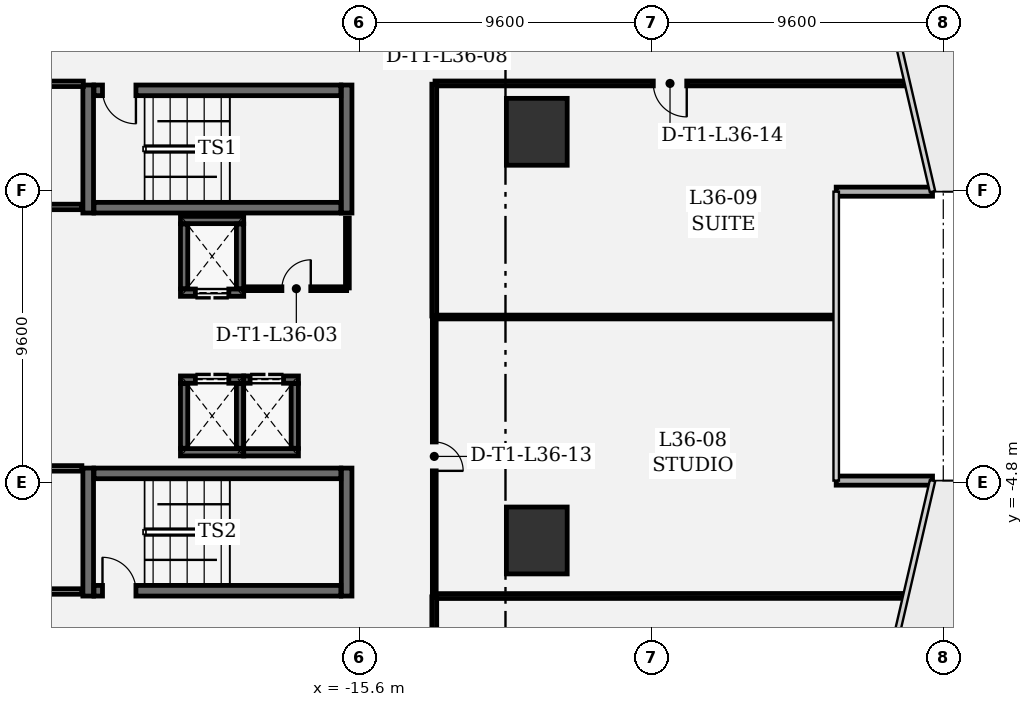
"""IFC4 building model, lengths in metres.
Left out: names, types, materials, properties, quantities, classifications, styles, units other than length and angle.
Written with IfcOpenShell. Run it as: python <this file> out.ifc"""

import sys

from ifc_helpers import new_model, si_unit, direction, frame, frame_2d, origin, origin_2d, place, context, subcontext, project, spatial, rectangle, extrude, element, fill, save


model = new_model("IFC4")
c1 = context("Model", 3, precision=1e-05, world=origin(), true_north=direction((0.0, 1.0)))
c2 = subcontext(c1, "Body", "Model", "MODEL_VIEW")
j1 = project(units=[si_unit("LENGTHUNIT", "METRE"), si_unit("PLANEANGLEUNIT", "RADIAN")], contexts=[c1])
p1 = place(None, origin())
s1 = spatial("IfcSite", under=j1, at=p1, CompositionType="ELEMENT")
p2 = place(p1, origin())
s2 = spatial("IfcBuilding", under=s1, at=p2, CompositionType="ELEMENT")
p3 = place(p2, frame((0.0, 0.0, 158.4)))
s3 = spatial("IfcBuildingStorey", under=s2, at=p3, CompositionType="ELEMENT", Elevation=158.4)
for number, where, z_axis, x_axis in (
    (1, (-9.77, -6.721, 0.0), (0.0, 0.0, 1.0), (1.0, 0.0, 0.0)),
    (2, (-9.77, 6.721, 0.0), (0.0, 0.0, 1.0), (1.0, 0.0, 0.0)),
):
    element("IfcColumn", number, at=place(p3, frame(where, z_axis=z_axis, x_axis=x_axis)), inside=s3, PredefinedType="COLUMN", context=c2, shape_type="SweptSolid", body=[
        extrude(rectangle(XDim=2.0, YDim=2.2, at=origin_2d()), origin(), (0.0, 0.0, 1.0), 4.05),
    ])
for number, where, z_axis, x_axis in (
    (3, (3.246, -4.752, 0.0), (0.0, 0.0, 1.0), (-1.0, 0.0, 0.0)),
    (4, (0.078, 4.752, 0.0), (0.0, 0.0, 1.0), (1.0, 0.0, 0.0)),
):
    element("IfcWall", number, at=place(p3, frame(where, z_axis=z_axis, x_axis=x_axis)), inside=s3, PredefinedType="SOLIDWALL", context=c2, shape_type="SweptSolid", body=[
        extrude(rectangle(XDim=3.168, YDim=0.3, at=frame_2d((1.584, 0.0))), origin(), (0.0, 0.0, 1.0), 3.78),
    ])
for number, where, z_axis, x_axis in (
    (5, (-24.525, 8.26, 0.0), (0.0, 0.0, 1.0), (0.0, -1.0, 0.0)),
    (6, (-16.025, 4.05, 0.0), (0.0, 0.0, 1.0), (0.0, 1.0, 0.0)),
):
    element("IfcWall", number, at=place(p3, frame(where, z_axis=z_axis, x_axis=x_axis)), inside=s3, PredefinedType="SHEAR", context=c2, shape_type="SweptSolid", body=[
        extrude(rectangle(XDim=4.21, YDim=0.35, at=frame_2d((2.105, 0.0))), origin(), (0.0, 0.0, 1.0), 3.78),
    ])
p4 = place(p3, frame((-24.335, 4.225, 0.0), z_axis=(0.0, 0.0, 1.0), x_axis=(1.0, 0.0, 0.0)))
e7 = element("IfcWall", 7, at=p4, inside=s3, PredefinedType="SHEAR", context=c2, shape_type="SweptSolid", body=[
    extrude(rectangle(XDim=8.12, YDim=0.35, at=frame_2d((4.06, 0.0))), origin(), (0.0, 0.0, 1.0), 3.78),
])
p5 = place(p3, frame((-16.215, 8.085, 0.0), z_axis=(0.0, 0.0, 1.0), x_axis=(-1.0, 0.0, 0.0)))
e8 = element("IfcWall", 8, at=p5, inside=s3, PredefinedType="SHEAR", context=c2, shape_type="SweptSolid", body=[
    extrude(rectangle(XDim=8.12, YDim=0.35, at=frame_2d((4.06, 0.0))), origin(), (0.0, 0.0, 1.0), 3.78),
])
p6 = place(p5, frame((6.74, 0.0, 0.0)))
e9 = element("IfcOpeningElement", 9, at=p6, cuts=e8, PredefinedType="OPENING", context=c2, shape_type="SweptSolid", body=[
    extrude(rectangle(XDim=1.1, YDim=2.2, at=frame_2d((0.55, 1.1))), frame((0.0, 0.185, 0.0), z_axis=(0.0, -1.0, 0.0), x_axis=(1.0, 0.0, 0.0)), (0.0, 0.0, 1.0), 0.37),
])
for number, where, z_axis, x_axis in (
    (10, (-24.525, -4.34, 0.0), (0.0, 0.0, 1.0), (0.0, -1.0, 0.0)),
    (11, (-16.025, -8.55, 0.0), (0.0, 0.0, 1.0), (0.0, 1.0, 0.0)),
):
    element("IfcWall", number, at=place(p3, frame(where, z_axis=z_axis, x_axis=x_axis)), inside=s3, PredefinedType="SHEAR", context=c2, shape_type="SweptSolid", body=[
        extrude(rectangle(XDim=4.21, YDim=0.35, at=frame_2d((2.105, 0.0))), origin(), (0.0, 0.0, 1.0), 3.78),
    ])
p7 = place(p3, frame((-24.335, -8.375, 0.0), z_axis=(0.0, 0.0, 1.0), x_axis=(1.0, 0.0, 0.0)))
e12 = element("IfcWall", 12, at=p7, inside=s3, PredefinedType="SHEAR", context=c2, shape_type="SweptSolid", body=[
    extrude(rectangle(XDim=8.12, YDim=0.35, at=frame_2d((4.06, 0.0))), origin(), (0.0, 0.0, 1.0), 3.78),
])
p8 = place(p7, frame((0.28, 0.0, 0.0)))
e13 = element("IfcOpeningElement", 13, at=p8, cuts=e12, PredefinedType="OPENING", context=c2, shape_type="SweptSolid", body=[
    extrude(rectangle(XDim=1.1, YDim=2.2, at=frame_2d((0.55, 1.1))), frame((0.0, 0.185, 0.0), z_axis=(0.0, -1.0, 0.0), x_axis=(1.0, 0.0, 0.0)), (0.0, 0.0, 1.0), 0.37),
])
p9 = place(p3, frame((-16.215, -4.515, 0.0), z_axis=(0.0, 0.0, 1.0), x_axis=(-1.0, 0.0, 0.0)))
e14 = element("IfcWall", 14, at=p9, inside=s3, PredefinedType="SHEAR", context=c2, shape_type="SweptSolid", body=[
    extrude(rectangle(XDim=8.12, YDim=0.35, at=frame_2d((4.06, 0.0))), origin(), (0.0, 0.0, 1.0), 3.78),
])
p10 = place(p3, frame((-19.41, 1.43, 0.0), z_axis=(0.0, 0.0, 1.0), x_axis=(-1.0, 0.0, 0.0)))
e15 = element("IfcWall", 15, at=p10, inside=s3, PredefinedType="SHEAR", context=c2, shape_type="SweptSolid", body=[
    extrude(rectangle(XDim=2.08, YDim=0.24, at=frame_2d((1.04, 0.0))), origin(), (0.0, 0.0, 1.0), 3.78),
])
p11 = place(p10, frame((0.49, 0.0, 0.0)))
e16 = element("IfcOpeningElement", 16, at=p11, cuts=e15, PredefinedType="OPENING", context=c2, shape_type="SweptSolid", body=[
    extrude(rectangle(XDim=1.1, YDim=2.2, at=frame_2d((0.55, 1.1))), frame((0.0, 0.13, 0.0), z_axis=(0.0, -1.0, 0.0), x_axis=(1.0, 0.0, 0.0)), (0.0, 0.0, 1.0), 0.26),
])
p12 = place(p3, frame((-21.49, 3.82, 0.0), z_axis=(0.0, 0.0, 1.0), x_axis=(1.0, 0.0, 0.0)))
e17 = element("IfcWall", 17, at=p12, inside=s3, PredefinedType="SHEAR", context=c2, shape_type="SweptSolid", body=[
    extrude(rectangle(XDim=2.08, YDim=0.24, at=frame_2d((1.04, 0.0))), origin(), (0.0, 0.0, 1.0), 3.78),
])
for number, where, z_axis, x_axis in (
    (18, (-21.37, 1.562, 0.0), (0.0, 0.0, 1.0), (0.0, 1.0, 0.0)),
    (19, (-19.53, 3.688, 0.0), (0.0, 0.0, 1.0), (0.0, -1.0, 0.0)),
):
    element("IfcWall", number, at=place(p3, frame(where, z_axis=z_axis, x_axis=x_axis)), inside=s3, PredefinedType="SHEAR", context=c2, shape_type="SweptSolid", body=[
        extrude(rectangle(XDim=2.126, YDim=0.24, at=frame_2d((1.063, 0.0))), origin(), (0.0, 0.0, 1.0), 3.78),
    ])
p13 = place(p3, frame((-19.41, -3.82, 0.0), z_axis=(0.0, 0.0, 1.0), x_axis=(-1.0, 0.0, 0.0)))
e20 = element("IfcWall", 20, at=p13, inside=s3, PredefinedType="SHEAR", context=c2, shape_type="SweptSolid", body=[
    extrude(rectangle(XDim=2.08, YDim=0.24, at=frame_2d((1.04, 0.0))), origin(), (0.0, 0.0, 1.0), 3.78),
])
p14 = place(p3, frame((-21.49, -1.43, 0.0), z_axis=(0.0, 0.0, 1.0), x_axis=(1.0, 0.0, 0.0)))
e21 = element("IfcWall", 21, at=p14, inside=s3, PredefinedType="SHEAR", context=c2, shape_type="SweptSolid", body=[
    extrude(rectangle(XDim=2.08, YDim=0.24, at=frame_2d((1.04, 0.0))), origin(), (0.0, 0.0, 1.0), 3.78),
])
p15 = place(p14, frame((0.49, 0.0, 0.0)))
e22 = element("IfcOpeningElement", 22, at=p15, cuts=e21, PredefinedType="OPENING", context=c2, shape_type="SweptSolid", body=[
    extrude(rectangle(XDim=1.1, YDim=2.2, at=frame_2d((0.55, 1.1))), frame((0.0, 0.13, 0.0), z_axis=(0.0, -1.0, 0.0), x_axis=(1.0, 0.0, 0.0)), (0.0, 0.0, 1.0), 0.26),
])
for number, where, z_axis, x_axis in (
    (23, (-21.37, -3.688, 0.0), (0.0, 0.0, 1.0), (0.0, 1.0, 0.0)),
    (24, (-19.53, -1.562, 0.0), (0.0, 0.0, 1.0), (0.0, -1.0, 0.0)),
):
    element("IfcWall", number, at=place(p3, frame(where, z_axis=z_axis, x_axis=x_axis)), inside=s3, PredefinedType="SHEAR", context=c2, shape_type="SweptSolid", body=[
        extrude(rectangle(XDim=2.126, YDim=0.24, at=frame_2d((1.063, 0.0))), origin(), (0.0, 0.0, 1.0), 3.78),
    ])
p16 = place(p3, frame((-17.61, -3.82, 0.0), z_axis=(0.0, 0.0, 1.0), x_axis=(-1.0, 0.0, 0.0)))
e25 = element("IfcWall", 25, at=p16, inside=s3, PredefinedType="SHEAR", context=c2, shape_type="SweptSolid", body=[
    extrude(rectangle(XDim=1.8, YDim=0.24, at=frame_2d((0.9, 0.0))), origin(), (0.0, 0.0, 1.0), 3.78),
])
p17 = place(p3, frame((-19.41, -1.43, 0.0), z_axis=(0.0, 0.0, 1.0), x_axis=(1.0, 0.0, 0.0)))
e26 = element("IfcWall", 26, at=p17, inside=s3, PredefinedType="SHEAR", context=c2, shape_type="SweptSolid", body=[
    extrude(rectangle(XDim=1.8, YDim=0.24, at=frame_2d((0.9, 0.0))), origin(), (0.0, 0.0, 1.0), 3.78),
])
p18 = place(p17, frame((0.21, 0.0, 0.0)))
e27 = element("IfcOpeningElement", 27, at=p18, cuts=e26, PredefinedType="OPENING", context=c2, shape_type="SweptSolid", body=[
    extrude(rectangle(XDim=1.1, YDim=2.2, at=frame_2d((0.55, 1.1))), frame((0.0, 0.13, 0.0), z_axis=(0.0, -1.0, 0.0), x_axis=(1.0, 0.0, 0.0)), (0.0, 0.0, 1.0), 0.26),
])
p19 = place(p3, frame((-17.73, -1.562, 0.0), z_axis=(0.0, 0.0, 1.0), x_axis=(0.0, -1.0, 0.0)))
e28 = element("IfcWall", 28, at=p19, inside=s3, PredefinedType="SHEAR", context=c2, shape_type="SweptSolid", body=[
    extrude(rectangle(XDim=2.126, YDim=0.24, at=frame_2d((1.063, 0.0))), origin(), (0.0, 0.0, 1.0), 3.78),
])
p20 = place(p3, frame((-28.355, 4.25, 0.0), z_axis=(0.0, 0.0, 1.0), x_axis=(1.0, 0.0, 0.0)))
e29 = element("IfcWall", 29, at=p20, inside=s3, PredefinedType="PARTITIONING", context=c2, shape_type="SweptSolid", body=[
    extrude(rectangle(XDim=3.622, YDim=0.18, at=frame_2d((1.811, 0.0))), origin(), (0.0, 0.0, 1.0), 3.78),
])
p21 = place(p3, frame((-24.684, 8.3, 0.0), z_axis=(0.0, 0.0, 1.0), x_axis=(-1.0, 0.0, 0.0)))
e30 = element("IfcWall", 30, at=p21, inside=s3, PredefinedType="PARTITIONING", context=c2, shape_type="SweptSolid", body=[
    extrude(rectangle(XDim=3.671, YDim=0.18, at=frame_2d((1.835, 0.0))), origin(), (0.0, 0.0, 1.0), 3.78),
])
p22 = place(p21, frame((1.335, 0.0, 0.0)))
e31 = element("IfcOpeningElement", 31, at=p22, cuts=e30, PredefinedType="OPENING", context=c2, shape_type="SweptSolid", body=[
    extrude(rectangle(XDim=1.0, YDim=2.15, at=frame_2d((0.5, 1.075))), frame((0.0, 0.1, 0.0), z_axis=(0.0, -1.0, 0.0), x_axis=(1.0, 0.0, 0.0)), (0.0, 0.0, 1.0), 0.2),
])
p23 = place(p3, frame((-28.355, -8.4, 0.0), z_axis=(0.0, 0.0, 1.0), x_axis=(1.0, 0.0, 0.0)))
e32 = element("IfcWall", 32, at=p23, inside=s3, PredefinedType="PARTITIONING", context=c2, shape_type="SweptSolid", body=[
    extrude(rectangle(XDim=3.622, YDim=0.18, at=frame_2d((1.811, 0.0))), origin(), (0.0, 0.0, 1.0), 3.78),
])
p24 = place(p23, frame((1.311, 0.0, 0.0)))
e33 = element("IfcOpeningElement", 33, at=p24, cuts=e32, PredefinedType="OPENING", context=c2, shape_type="SweptSolid", body=[
    extrude(rectangle(XDim=1.0, YDim=2.15, at=frame_2d((0.5, 1.075))), frame((0.0, 0.1, 0.0), z_axis=(0.0, -1.0, 0.0), x_axis=(1.0, 0.0, 0.0)), (0.0, 0.0, 1.0), 0.2),
])
p25 = place(p3, frame((-24.733, -4.35, 0.0), z_axis=(0.0, 0.0, 1.0), x_axis=(-1.0, 0.0, 0.0)))
e34 = element("IfcWall", 34, at=p25, inside=s3, PredefinedType="PARTITIONING", context=c2, shape_type="SweptSolid", body=[
    extrude(rectangle(XDim=3.622, YDim=0.18, at=frame_2d((1.811, 0.0))), origin(), (0.0, 0.0, 1.0), 3.78),
])
p26 = place(p3, frame((-19.334, 1.56, 0.0), z_axis=(0.0, 0.0, 1.0), x_axis=(1.0, 0.0, 0.0)))
e35 = element("IfcWall", 35, at=p26, inside=s3, PredefinedType="PARTITIONING", context=c2, shape_type="SweptSolid", body=[
    extrude(rectangle(XDim=3.309, YDim=0.125, at=frame_2d((1.654, 0.0))), origin(), (0.0, 0.0, 1.0), 3.78),
])
p27 = place(p26, frame((1.179, 0.0, 0.0)))
e36 = element("IfcOpeningElement", 36, at=p27, cuts=e35, PredefinedType="OPENING", context=c2, shape_type="SweptSolid", body=[
    extrude(rectangle(XDim=0.95, YDim=2.15, at=frame_2d((0.475, 1.075))), frame((0.0, 0.073, 0.0), z_axis=(0.0, -1.0, 0.0), x_axis=(1.0, 0.0, 0.0)), (0.0, 0.0, 1.0), 0.145),
])
p28 = place(p3, frame((-16.0, 1.585, 0.0), z_axis=(0.0, 0.0, 1.0), x_axis=(0.0, 1.0, 0.0)))
e37 = element("IfcWall", 37, at=p28, inside=s3, PredefinedType="PARTITIONING", context=c2, shape_type="SweptSolid", body=[
    extrude(rectangle(XDim=2.302, YDim=0.125, at=frame_2d((1.151, 0.0))), origin(), (0.0, 0.0, 1.0), 3.78),
])
p29 = place(p3, frame((2.287, -8.545, 0.0), z_axis=(0.0, 0.0, 1.0), x_axis=(-0.999999939213, -0.000348675014, 0.0)))
e38 = element("IfcWall", 38, at=p29, inside=s3, PredefinedType="PARTITIONING", context=c2, shape_type="SweptSolid", body=[
    extrude(rectangle(XDim=15.404, YDim=0.16, at=frame_2d((7.702, 0.0))), origin(), (0.0, 0.0, 1.0), 2.895),
])
p30 = place(p3, frame((-13.142, -10.933, 0.0), z_axis=(0.0, 0.0, 1.0), x_axis=(0.0, 1.0, 0.0)))
e39 = element("IfcWall", 39, at=p30, inside=s3, PredefinedType="PARTITIONING", context=c2, shape_type="SweptSolid", body=[
    extrude(rectangle(XDim=2.358, YDim=0.16, at=frame_2d((1.179, 0.0))), origin(), (0.0, 0.0, 1.0), 3.78),
])
p31 = place(p3, frame((-0.002, 0.629, 0.0), z_axis=(0.0, 0.0, 1.0), x_axis=(-1.0, 0.0, 0.0)))
e40 = element("IfcWall", 40, at=p31, inside=s3, PredefinedType="PARTITIONING", context=c2, shape_type="SweptSolid", body=[
    extrude(rectangle(XDim=13.115, YDim=0.125, at=frame_2d((6.558, 0.0))), origin(), (0.0, 0.0, 1.0), 3.78),
])
p32 = place(p3, frame((-13.142, 0.604, 0.0), z_axis=(0.0, 0.0, 1.0), x_axis=(0.0, -1.0, 0.0)))
e41 = element("IfcWall", 41, at=p32, inside=s3, PredefinedType="PARTITIONING", context=c2, shape_type="SweptSolid", body=[
    extrude(rectangle(XDim=9.121, YDim=0.125, at=frame_2d((4.561, 0.0))), origin(), (0.0, 0.0, 1.0), 3.78),
])
p33 = place(p32, frame((4.086, 0.0, 0.0)))
e42 = element("IfcOpeningElement", 42, at=p33, cuts=e41, PredefinedType="OPENING", context=c2, shape_type="SweptSolid", body=[
    extrude(rectangle(XDim=0.95, YDim=2.15, at=frame_2d((0.475, 1.075))), frame((0.0, 0.073, 0.0), z_axis=(0.0, -1.0, 0.0), x_axis=(1.0, 0.0, 0.0)), (0.0, 0.0, 1.0), 0.145),
])
p34 = place(p3, frame((2.341, 8.312, 0.0), z_axis=(0.0, 0.0, 1.0), x_axis=(-1.0, 0.0, 0.0)))
e43 = element("IfcWall", 43, at=p34, inside=s3, PredefinedType="PARTITIONING", context=c2, shape_type="SweptSolid", body=[
    extrude(rectangle(XDim=15.458, YDim=0.16, at=frame_2d((7.729, 0.0))), origin(), (0.0, 0.0, 1.0), 2.895),
])
p35 = place(p34, frame((7.179, 0.0, 0.0)))
e44 = element("IfcOpeningElement", 44, at=p35, cuts=e43, PredefinedType="OPENING", context=c2, shape_type="SweptSolid", body=[
    extrude(rectangle(XDim=1.1, YDim=2.15, at=frame_2d((0.55, 1.075))), frame((0.0, 0.09, 0.0), z_axis=(0.0, -1.0, 0.0), x_axis=(1.0, 0.0, 0.0)), (0.0, 0.0, 1.0), 0.18),
])
p36 = place(p3, frame((-13.142, 8.287, 0.0), z_axis=(0.0, 0.0, 1.0), x_axis=(0.0, -1.0, 0.0)))
e45 = element("IfcWall", 45, at=p36, inside=s3, PredefinedType="PARTITIONING", context=c2, shape_type="SweptSolid", body=[
    extrude(rectangle(XDim=7.625, YDim=0.16, at=frame_2d((3.812, 0.0))), origin(), (0.0, 0.0, 1.0), 3.78),
])
p37 = place(p6, origin())
e46 = element("IfcDoor", 46, at=p37, inside=s3, OperationType="SINGLE_SWING_LEFT", PredefinedType="DOOR", context=c2, shape_type="SweptSolid", body=[
    extrude(rectangle(XDim=1.1, YDim=2.2, at=frame_2d((0.55, 1.1))), frame((0.0, 0.025, 0.0), z_axis=(0.0, -1.0, 0.0), x_axis=(1.0, 0.0, 0.0)), (0.0, 0.0, 1.0), 0.05),
])
fill(e9, e46)
p38 = place(p8, origin())
e47 = element("IfcDoor", 47, at=p38, inside=s3, OperationType="SINGLE_SWING_LEFT", PredefinedType="DOOR", context=c2, shape_type="SweptSolid", body=[
    extrude(rectangle(XDim=1.1, YDim=2.2, at=frame_2d((0.55, 1.1))), frame((0.0, 0.025, 0.0), z_axis=(0.0, -1.0, 0.0), x_axis=(1.0, 0.0, 0.0)), (0.0, 0.0, 1.0), 0.05),
])
fill(e13, e47)
p39 = place(p11, origin())
e48 = element("IfcDoor", 48, at=p39, inside=s3, OperationType="DOUBLE_DOOR_SLIDING", PredefinedType="DOOR", context=c2, shape_type="SweptSolid", body=[
    extrude(rectangle(XDim=1.1, YDim=2.2, at=frame_2d((0.55, 1.1))), frame((0.0, 0.025, 0.0), z_axis=(0.0, -1.0, 0.0), x_axis=(1.0, 0.0, 0.0)), (0.0, 0.0, 1.0), 0.05),
])
fill(e16, e48)
p40 = place(p15, origin())
e49 = element("IfcDoor", 49, at=p40, inside=s3, OperationType="DOUBLE_DOOR_SLIDING", PredefinedType="DOOR", context=c2, shape_type="SweptSolid", body=[
    extrude(rectangle(XDim=1.1, YDim=2.2, at=frame_2d((0.55, 1.1))), frame((0.0, 0.025, 0.0), z_axis=(0.0, -1.0, 0.0), x_axis=(1.0, 0.0, 0.0)), (0.0, 0.0, 1.0), 0.05),
])
fill(e22, e49)
p41 = place(p18, origin())
e50 = element("IfcDoor", 50, at=p41, inside=s3, OperationType="DOUBLE_DOOR_SLIDING", PredefinedType="DOOR", context=c2, shape_type="SweptSolid", body=[
    extrude(rectangle(XDim=1.1, YDim=2.2, at=frame_2d((0.55, 1.1))), frame((0.0, 0.025, 0.0), z_axis=(0.0, -1.0, 0.0), x_axis=(1.0, 0.0, 0.0)), (0.0, 0.0, 1.0), 0.05),
])
fill(e27, e50)
p42 = place(p27, origin())
e51 = element("IfcDoor", 51, at=p42, inside=s3, OperationType="SINGLE_SWING_RIGHT", PredefinedType="DOOR", context=c2, shape_type="SweptSolid", body=[
    extrude(rectangle(XDim=0.95, YDim=2.15, at=frame_2d((0.475, 1.075))), frame((0.0, 0.025, 0.0), z_axis=(0.0, -1.0, 0.0), x_axis=(1.0, 0.0, 0.0)), (0.0, 0.0, 1.0), 0.05),
])
fill(e36, e51)
p43 = place(p33, origin())
e52 = element("IfcDoor", 52, at=p43, inside=s3, OperationType="SINGLE_SWING_RIGHT", PredefinedType="DOOR", context=c2, shape_type="SweptSolid", body=[
    extrude(rectangle(XDim=0.95, YDim=2.15, at=frame_2d((0.475, 1.075))), frame((0.0, 0.025, 0.0), z_axis=(0.0, -1.0, 0.0), x_axis=(1.0, 0.0, 0.0)), (0.0, 0.0, 1.0), 0.05),
])
fill(e42, e52)
p44 = place(p35, origin())
e53 = element("IfcDoor", 53, at=p44, inside=s3, OperationType="SINGLE_SWING_LEFT", PredefinedType="DOOR", context=c2, shape_type="SweptSolid", body=[
    extrude(rectangle(XDim=1.1, YDim=2.15, at=frame_2d((0.55, 1.075))), frame((0.0, 0.025, 0.0), z_axis=(0.0, -1.0, 0.0), x_axis=(1.0, 0.0, 0.0)), (0.0, 0.0, 1.0), 0.05),
])
fill(e44, e53)
save(model, sys.argv[1])
